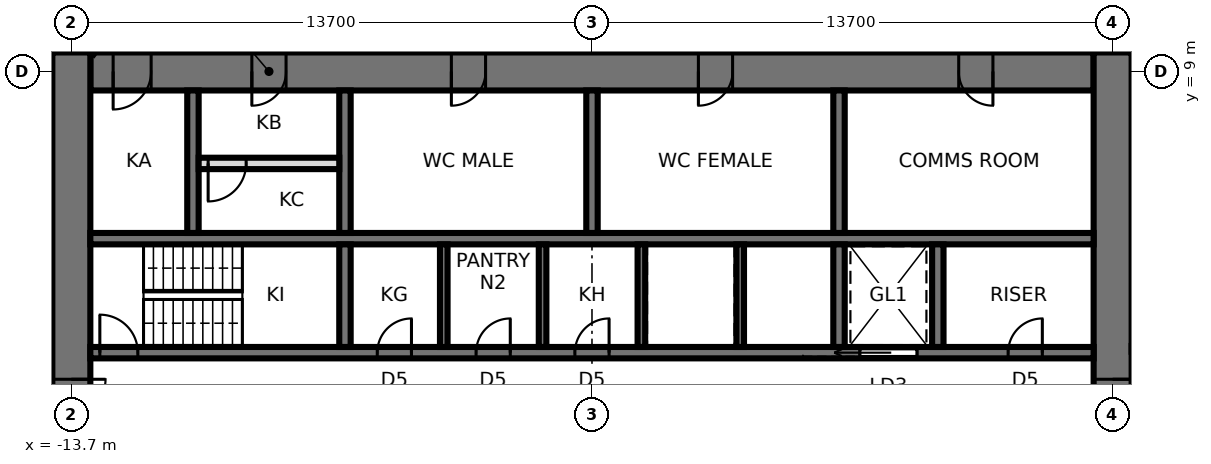
"""IFC4 building model, lengths in metres.
Left out: names, types, materials, properties, quantities, classifications, styles, units other than length and angle.
Written with IfcOpenShell. Run it as: python <this file> out.ifc"""

import sys

from ifc_helpers import new_model, si_unit, direction, frame, frame_2d, origin, place, context, subcontext, project, spatial, rectangle, extrude, element, fill, save


model = new_model("IFC4")
c1 = context("Model", 3, precision=1e-05, world=origin(), true_north=direction((0.0, 1.0)))
c2 = subcontext(c1, "Body", "Model", "MODEL_VIEW")
j1 = project(units=[si_unit("LENGTHUNIT", "METRE"), si_unit("PLANEANGLEUNIT", "RADIAN")], contexts=[c1])
p1 = place(None, origin())
s1 = spatial("IfcSite", under=j1, at=p1, CompositionType="ELEMENT")
p2 = place(p1, origin())
s2 = spatial("IfcBuilding", under=s1, at=p2, CompositionType="ELEMENT")
p3 = place(p2, frame((0.0, 0.0, 154.8)))
s3 = spatial("IfcBuildingStorey", under=s2, at=p3, CompositionType="ELEMENT", Elevation=154.8)
p4 = place(p3, frame((13.2, 9.0, 0.0), z_axis=(0.0, 0.0, 1.0), x_axis=(-1.0, 0.0, 0.0)))
e1 = element("IfcWall", 1, at=p4, inside=s3, PredefinedType="SHEAR", context=c2, shape_type="SweptSolid", body=[
    extrude(rectangle(XDim=26.4, YDim=1.0, at=frame_2d((13.2, 0.0))), origin(), (0.0, 0.0, 1.0), 3.9),
])
p5 = place(p4, frame((2.65, 0.0, 0.0)))
e2 = element("IfcOpeningElement", 2, at=p5, cuts=e1, PredefinedType="OPENING", context=c2, shape_type="SweptSolid", body=[
    extrude(rectangle(XDim=0.9, YDim=2.1, at=frame_2d((0.45, 1.05))), frame((0.0, 0.51, 0.0), z_axis=(0.0, -1.0, 0.0), x_axis=(1.0, 0.0, 0.0)), (0.0, 0.0, 1.0), 1.02),
])
p6 = place(p4, frame((9.5, 0.0, 0.0)))
e3 = element("IfcOpeningElement", 3, at=p6, cuts=e1, PredefinedType="OPENING", context=c2, shape_type="SweptSolid", body=[
    extrude(rectangle(XDim=0.9, YDim=2.1, at=frame_2d((0.45, 1.05))), frame((0.0, 0.51, 0.0), z_axis=(0.0, -1.0, 0.0), x_axis=(1.0, 0.0, 0.0)), (0.0, 0.0, 1.0), 1.02),
])
p7 = place(p4, frame((16.0, 0.0, 0.0)))
e4 = element("IfcOpeningElement", 4, at=p7, cuts=e1, PredefinedType="OPENING", context=c2, shape_type="SweptSolid", body=[
    extrude(rectangle(XDim=0.9, YDim=2.1, at=frame_2d((0.45, 1.05))), frame((0.0, 0.51, 0.0), z_axis=(0.0, -1.0, 0.0), x_axis=(1.0, 0.0, 0.0)), (0.0, 0.0, 1.0), 1.02),
])
p8 = place(p4, frame((21.25, 0.0, 0.0)))
e5 = element("IfcOpeningElement", 5, at=p8, cuts=e1, PredefinedType="OPENING", context=c2, shape_type="SweptSolid", body=[
    extrude(rectangle(XDim=0.9, YDim=2.1, at=frame_2d((0.45, 1.05))), frame((0.0, 0.51, 0.0), z_axis=(0.0, -1.0, 0.0), x_axis=(1.0, 0.0, 0.0)), (0.0, 0.0, 1.0), 1.02),
])
p9 = place(p4, frame((24.8, 0.0, 0.0)))
e6 = element("IfcOpeningElement", 6, at=p9, cuts=e1, PredefinedType="OPENING", context=c2, shape_type="SweptSolid", body=[
    extrude(rectangle(XDim=1.0, YDim=2.1, at=frame_2d((0.5, 1.05))), frame((0.0, 0.51, 0.0), z_axis=(0.0, -1.0, 0.0), x_axis=(1.0, 0.0, 0.0)), (0.0, 0.0, 1.0), 1.02),
])
p10 = place(p3, frame((13.7, -9.5, 0.0), z_axis=(0.0, 0.0, 1.0), x_axis=(0.0, 1.0, 0.0)))
e7 = element("IfcWall", 7, at=p10, inside=s3, PredefinedType="SHEAR", context=c2, shape_type="SweptSolid", body=[
    extrude(rectangle(XDim=19.0, YDim=1.0, at=frame_2d((9.5, 0.0))), origin(), (0.0, 0.0, 1.0), 3.9),
])
p11 = place(p10, frame((8.6, 0.0, 0.0)))
e8 = element("IfcOpeningElement", 8, at=p11, cuts=e7, PredefinedType="OPENING", context=c2, shape_type="SweptSolid", body=[
    extrude(rectangle(XDim=1.8, YDim=2.4, at=frame_2d((0.9, 1.2))), frame((0.0, 0.51, 0.0), z_axis=(0.0, -1.0, 0.0), x_axis=(1.0, 0.0, 0.0)), (0.0, 0.0, 1.0), 1.02),
])
p12 = place(p3, frame((-13.7, 9.5, 0.0), z_axis=(0.0, 0.0, 1.0), x_axis=(0.0, -1.0, 0.0)))
e9 = element("IfcWall", 9, at=p12, inside=s3, PredefinedType="SHEAR", context=c2, shape_type="SweptSolid", body=[
    extrude(rectangle(XDim=19.0, YDim=1.0, at=frame_2d((9.5, 0.0))), origin(), (0.0, 0.0, 1.0), 3.9),
])
p13 = place(p12, frame((8.6, 0.0, 0.0)))
e10 = element("IfcOpeningElement", 10, at=p13, cuts=e9, PredefinedType="OPENING", context=c2, shape_type="SweptSolid", body=[
    extrude(rectangle(XDim=1.8, YDim=2.4, at=frame_2d((0.9, 1.2))), frame((0.0, 0.51, 0.0), z_axis=(0.0, -1.0, 0.0), x_axis=(1.0, 0.0, 0.0)), (0.0, 0.0, 1.0), 1.02),
])
p14 = place(p3, frame((-13.2, 1.6, 0.0), z_axis=(0.0, 0.0, 1.0), x_axis=(1.0, 0.0, 0.0)))
e11 = element("IfcWall", 11, at=p14, inside=s3, PredefinedType="SHEAR", context=c2, shape_type="SweptSolid", body=[
    extrude(rectangle(XDim=26.4, YDim=0.3, at=frame_2d((13.2, 0.0))), origin(), (0.0, 0.0, 1.0), 3.9),
])
p15 = place(p14, frame((0.25, 0.0, 0.0)))
e12 = element("IfcOpeningElement", 12, at=p15, cuts=e11, PredefinedType="OPENING", context=c2, shape_type="SweptSolid", body=[
    extrude(rectangle(XDim=1.0, YDim=2.1, at=frame_2d((0.5, 1.05))), frame((0.0, 0.16, 0.0), z_axis=(0.0, -1.0, 0.0), x_axis=(1.0, 0.0, 0.0)), (0.0, 0.0, 1.0), 0.32),
])
p16 = place(p14, frame((20.25, 0.0, 0.0)))
e13 = element("IfcOpeningElement", 13, at=p16, cuts=e11, PredefinedType="OPENING", context=c2, shape_type="SweptSolid", body=[
    extrude(rectangle(XDim=1.5, YDim=2.4, at=frame_2d((0.75, 1.2))), frame((0.0, 0.16, 0.0), z_axis=(0.0, -1.0, 0.0), x_axis=(1.0, 0.0, 0.0)), (0.0, 0.0, 1.0), 0.32),
])
p17 = place(p14, frame((7.55, 0.0, 0.0)))
e14 = element("IfcOpeningElement", 14, at=p17, cuts=e11, PredefinedType="OPENING", context=c2, shape_type="SweptSolid", body=[
    extrude(rectangle(XDim=0.9, YDim=2.1, at=frame_2d((0.45, 1.05))), frame((0.0, 0.16, 0.0), z_axis=(0.0, -1.0, 0.0), x_axis=(1.0, 0.0, 0.0)), (0.0, 0.0, 1.0), 0.32),
])
p18 = place(p14, frame((10.15, 0.0, 0.0)))
e15 = element("IfcOpeningElement", 15, at=p18, cuts=e11, PredefinedType="OPENING", context=c2, shape_type="SweptSolid", body=[
    extrude(rectangle(XDim=0.9, YDim=2.1, at=frame_2d((0.45, 1.05))), frame((0.0, 0.16, 0.0), z_axis=(0.0, -1.0, 0.0), x_axis=(1.0, 0.0, 0.0)), (0.0, 0.0, 1.0), 0.32),
])
p19 = place(p14, frame((12.75, 0.0, 0.0)))
e16 = element("IfcOpeningElement", 16, at=p19, cuts=e11, PredefinedType="OPENING", context=c2, shape_type="SweptSolid", body=[
    extrude(rectangle(XDim=0.9, YDim=2.1, at=frame_2d((0.45, 1.05))), frame((0.0, 0.16, 0.0), z_axis=(0.0, -1.0, 0.0), x_axis=(1.0, 0.0, 0.0)), (0.0, 0.0, 1.0), 0.32),
])
p20 = place(p14, frame((24.15, 0.0, 0.0)))
e17 = element("IfcOpeningElement", 17, at=p20, cuts=e11, PredefinedType="OPENING", context=c2, shape_type="SweptSolid", body=[
    extrude(rectangle(XDim=0.9, YDim=2.1, at=frame_2d((0.45, 1.05))), frame((0.0, 0.16, 0.0), z_axis=(0.0, -1.0, 0.0), x_axis=(1.0, 0.0, 0.0)), (0.0, 0.0, 1.0), 0.32),
])
p21 = place(p3, frame((-13.2, 4.6, 0.0), z_axis=(0.0, 0.0, 1.0), x_axis=(1.0, 0.0, 0.0)))
e18 = element("IfcWall", 18, at=p21, inside=s3, PredefinedType="SHEAR", context=c2, shape_type="SweptSolid", body=[
    extrude(rectangle(XDim=26.4, YDim=0.3, at=frame_2d((13.2, 0.0))), origin(), (0.0, 0.0, 1.0), 3.9),
])
p22 = place(p3, frame((-6.5, 1.75, 0.0), z_axis=(0.0, 0.0, 1.0), x_axis=(0.0, 1.0, 0.0)))
e19 = element("IfcWall", 19, at=p22, inside=s3, PredefinedType="SHEAR", context=c2, shape_type="SweptSolid", body=[
    extrude(rectangle(XDim=2.7, YDim=0.3, at=frame_2d((1.35, 0.0))), origin(), (0.0, 0.0, 1.0), 3.9),
])
p23 = place(p3, frame((-6.5, 4.75, 0.0), z_axis=(0.0, 0.0, 1.0), x_axis=(0.0, 1.0, 0.0)))
e20 = element("IfcWall", 20, at=p23, inside=s3, PredefinedType="SHEAR", context=c2, shape_type="SweptSolid", body=[
    extrude(rectangle(XDim=3.75, YDim=0.3, at=frame_2d((1.875, 0.0))), origin(), (0.0, 0.0, 1.0), 3.9),
])
p24 = place(p3, frame((6.5, 1.75, 0.0), z_axis=(0.0, 0.0, 1.0), x_axis=(0.0, 1.0, 0.0)))
e21 = element("IfcWall", 21, at=p24, inside=s3, PredefinedType="SHEAR", context=c2, shape_type="SweptSolid", body=[
    extrude(rectangle(XDim=2.7, YDim=0.3, at=frame_2d((1.35, 0.0))), origin(), (0.0, 0.0, 1.0), 3.9),
])
p25 = place(p3, frame((6.5, 4.75, 0.0), z_axis=(0.0, 0.0, 1.0), x_axis=(0.0, 1.0, 0.0)))
e22 = element("IfcWall", 22, at=p25, inside=s3, PredefinedType="SHEAR", context=c2, shape_type="SweptSolid", body=[
    extrude(rectangle(XDim=3.75, YDim=0.3, at=frame_2d((1.875, 0.0))), origin(), (0.0, 0.0, 1.0), 3.9),
])
for number, where, z_axis, x_axis in (
    (23, (-3.9, 1.75, 0.0), (0.0, 0.0, 1.0), (0.0, 1.0, 0.0)),
    (24, (-1.3, 1.75, 0.0), (0.0, 0.0, 1.0), (0.0, 1.0, 0.0)),
    (25, (1.3, 1.75, 0.0), (0.0, 0.0, 1.0), (0.0, 1.0, 0.0)),
    (26, (3.9, 1.75, 0.0), (0.0, 0.0, 1.0), (0.0, 1.0, 0.0)),
):
    element("IfcWall", number, at=place(p3, frame(where, z_axis=z_axis, x_axis=x_axis)), inside=s3, PredefinedType="SHEAR", context=c2, shape_type="SweptSolid", body=[
        extrude(rectangle(XDim=2.7, YDim=0.2, at=frame_2d((1.35, 0.0))), origin(), (0.0, 0.0, 1.0), 3.9),
    ])
for number, where, z_axis, x_axis in (
    (27, (0.0, 4.75, 0.0), (0.0, 0.0, 1.0), (0.0, 1.0, 0.0)),
    (28, (-10.5, 4.75, 0.0), (0.0, 0.0, 1.0), (0.0, 1.0, 0.0)),
):
    element("IfcWall", number, at=place(p3, frame(where, z_axis=z_axis, x_axis=x_axis)), inside=s3, PredefinedType="SHEAR", context=c2, shape_type="SweptSolid", body=[
        extrude(rectangle(XDim=3.75, YDim=0.3, at=frame_2d((1.875, 0.0))), origin(), (0.0, 0.0, 1.0), 3.9),
    ])
p26 = place(p3, frame((9.1, 1.75, 0.0), z_axis=(0.0, 0.0, 1.0), x_axis=(0.0, 1.0, 0.0)))
e29 = element("IfcWall", 29, at=p26, inside=s3, PredefinedType="SHEAR", context=c2, shape_type="SweptSolid", body=[
    extrude(rectangle(XDim=2.7, YDim=0.3, at=frame_2d((1.35, 0.0))), origin(), (0.0, 0.0, 1.0), 3.9),
])
p27 = place(p3, frame((-10.35, 6.58, 0.0), z_axis=(0.0, 0.0, 1.0), x_axis=(1.0, 0.0, 0.0)))
e30 = element("IfcWall", 30, at=p27, inside=s3, PredefinedType="PARTITIONING", context=c2, shape_type="SweptSolid", body=[
    extrude(rectangle(XDim=3.7, YDim=0.3, at=frame_2d((1.85, 0.0))), origin(), (0.0, 0.0, 1.0), 3.74),
])
p28 = place(p27, frame((0.25, 0.0, 0.0)))
e31 = element("IfcOpeningElement", 31, at=p28, cuts=e30, PredefinedType="OPENING", context=c2, shape_type="SweptSolid", body=[
    extrude(rectangle(XDim=1.0, YDim=2.4, at=frame_2d((0.5, 1.2))), frame((0.0, 0.16, 0.0), z_axis=(0.0, -1.0, 0.0), x_axis=(1.0, 0.0, 0.0)), (0.0, 0.0, 1.0), 0.32),
])
p29 = place(p3, frame((-19.584, 14.229, 0.0), z_axis=(0.0, 0.0, 1.0), x_axis=(0.809005026648, -0.587801724103, 0.0)))
e32 = element("IfcWall", 32, at=p29, inside=s3, PredefinedType="PARTITIONING", context=c2, shape_type="SweptSolid", body=[
    extrude(rectangle(XDim=8.045, YDim=0.12, at=frame_2d((4.022, 0.0))), origin(), (0.0, 0.0, 1.0), 2.94),
])
p30 = place(p13, origin())
e33 = element("IfcDoor", 33, at=p30, inside=s3, OperationType="DOUBLE_DOOR_SINGLE_SWING", PredefinedType="DOOR", context=c2, shape_type="SweptSolid", body=[
    extrude(rectangle(XDim=1.72, YDim=2.36, at=frame_2d((0.9, 1.18))), frame((0.0, 0.025, 0.0), z_axis=(0.0, -1.0, 0.0), x_axis=(1.0, 0.0, 0.0)), (0.0, 0.0, 1.0), 0.05),
    extrude(rectangle(XDim=0.04, YDim=2.4, at=frame_2d((0.02, 1.2))), frame((0.0, 0.25, 0.0), z_axis=(0.0, -1.0, 0.0), x_axis=(1.0, 0.0, 0.0)), (0.0, 0.0, 1.0), 0.5),
    extrude(rectangle(XDim=0.04, YDim=2.4, at=frame_2d((1.78, 1.2))), frame((0.0, 0.25, 0.0), z_axis=(0.0, -1.0, 0.0), x_axis=(1.0, 0.0, 0.0)), (0.0, 0.0, 1.0), 0.5),
    extrude(rectangle(XDim=1.72, YDim=0.04, at=frame_2d((0.9, 2.38))), frame((0.0, 0.25, 0.0), z_axis=(0.0, -1.0, 0.0), x_axis=(1.0, 0.0, 0.0)), (0.0, 0.0, 1.0), 0.5),
])
fill(e10, e33)
p31 = place(p11, frame((1.8, 0.0, 0.0), z_axis=(0.0, 0.0, 1.0), x_axis=(-1.0, 0.0, 0.0)))
e34 = element("IfcDoor", 34, at=p31, inside=s3, OperationType="DOUBLE_DOOR_SINGLE_SWING", PredefinedType="DOOR", context=c2, shape_type="SweptSolid", body=[
    extrude(rectangle(XDim=1.72, YDim=2.36, at=frame_2d((0.9, 1.18))), frame((0.0, 0.025, 0.0), z_axis=(0.0, -1.0, 0.0), x_axis=(1.0, 0.0, 0.0)), (0.0, 0.0, 1.0), 0.05),
    extrude(rectangle(XDim=0.04, YDim=2.4, at=frame_2d((1.78, 1.2))), frame((0.0, 0.25, 0.0), z_axis=(0.0, -1.0, 0.0), x_axis=(1.0, 0.0, 0.0)), (0.0, 0.0, 1.0), 0.5),
    extrude(rectangle(XDim=0.04, YDim=2.4, at=frame_2d((0.02, 1.2))), frame((0.0, 0.25, 0.0), z_axis=(0.0, -1.0, 0.0), x_axis=(1.0, 0.0, 0.0)), (0.0, 0.0, 1.0), 0.5),
    extrude(rectangle(XDim=1.72, YDim=0.04, at=frame_2d((0.9, 2.38))), frame((0.0, 0.25, 0.0), z_axis=(0.0, -1.0, 0.0), x_axis=(1.0, 0.0, 0.0)), (0.0, 0.0, 1.0), 0.5),
])
fill(e8, e34)
p32 = place(p15, origin())
e35 = element("IfcDoor", 35, at=p32, inside=s3, OperationType="SINGLE_SWING_LEFT", PredefinedType="DOOR", context=c2, shape_type="SweptSolid", body=[
    extrude(rectangle(XDim=1.0, YDim=2.1, at=frame_2d((0.5, 1.05))), frame((0.0, 0.025, 0.0), z_axis=(0.0, -1.0, 0.0), x_axis=(1.0, 0.0, 0.0)), (0.0, 0.0, 1.0), 0.05),
])
fill(e12, e35)
p33 = place(p16, origin())
e36 = element("IfcDoor", 36, at=p33, inside=s3, OperationType="SLIDING_TO_LEFT", PredefinedType="DOOR", context=c2, shape_type="SweptSolid", body=[
    extrude(rectangle(XDim=1.5, YDim=2.4, at=frame_2d((0.75, 1.2))), frame((0.0, 0.025, 0.0), z_axis=(0.0, -1.0, 0.0), x_axis=(1.0, 0.0, 0.0)), (0.0, 0.0, 1.0), 0.05),
])
fill(e13, e36)
p34 = place(p17, origin())
e37 = element("IfcDoor", 37, at=p34, inside=s3, OperationType="SINGLE_SWING_RIGHT", PredefinedType="DOOR", context=c2, shape_type="SweptSolid", body=[
    extrude(rectangle(XDim=0.9, YDim=2.1, at=frame_2d((0.45, 1.05))), frame((0.0, 0.025, 0.0), z_axis=(0.0, -1.0, 0.0), x_axis=(1.0, 0.0, 0.0)), (0.0, 0.0, 1.0), 0.05),
])
fill(e14, e37)
p35 = place(p18, origin())
e38 = element("IfcDoor", 38, at=p35, inside=s3, OperationType="SINGLE_SWING_RIGHT", PredefinedType="DOOR", context=c2, shape_type="SweptSolid", body=[
    extrude(rectangle(XDim=0.9, YDim=2.1, at=frame_2d((0.45, 1.05))), frame((0.0, 0.025, 0.0), z_axis=(0.0, -1.0, 0.0), x_axis=(1.0, 0.0, 0.0)), (0.0, 0.0, 1.0), 0.05),
])
fill(e15, e38)
p36 = place(p19, origin())
e39 = element("IfcDoor", 39, at=p36, inside=s3, OperationType="SINGLE_SWING_RIGHT", PredefinedType="DOOR", context=c2, shape_type="SweptSolid", body=[
    extrude(rectangle(XDim=0.9, YDim=2.1, at=frame_2d((0.45, 1.05))), frame((0.0, 0.025, 0.0), z_axis=(0.0, -1.0, 0.0), x_axis=(1.0, 0.0, 0.0)), (0.0, 0.0, 1.0), 0.05),
])
fill(e16, e39)
p37 = place(p20, origin())
e40 = element("IfcDoor", 40, at=p37, inside=s3, OperationType="SINGLE_SWING_RIGHT", PredefinedType="DOOR", context=c2, shape_type="SweptSolid", body=[
    extrude(rectangle(XDim=0.9, YDim=2.1, at=frame_2d((0.45, 1.05))), frame((0.0, 0.025, 0.0), z_axis=(0.0, -1.0, 0.0), x_axis=(1.0, 0.0, 0.0)), (0.0, 0.0, 1.0), 0.05),
])
fill(e17, e40)
p38 = place(p5, origin())
e41 = element("IfcDoor", 41, at=p38, inside=s3, OperationType="SINGLE_SWING_LEFT", PredefinedType="DOOR", context=c2, shape_type="SweptSolid", body=[
    extrude(rectangle(XDim=0.82, YDim=2.06, at=frame_2d((0.45, 1.03))), frame((0.0, 0.025, 0.0), z_axis=(0.0, -1.0, 0.0), x_axis=(1.0, 0.0, 0.0)), (0.0, 0.0, 1.0), 0.05),
    extrude(rectangle(XDim=0.04, YDim=2.1, at=frame_2d((0.02, 1.05))), frame((0.0, 0.25, 0.0), z_axis=(0.0, -1.0, 0.0), x_axis=(1.0, 0.0, 0.0)), (0.0, 0.0, 1.0), 0.5),
    extrude(rectangle(XDim=0.04, YDim=2.1, at=frame_2d((0.88, 1.05))), frame((0.0, 0.25, 0.0), z_axis=(0.0, -1.0, 0.0), x_axis=(1.0, 0.0, 0.0)), (0.0, 0.0, 1.0), 0.5),
    extrude(rectangle(XDim=0.82, YDim=0.04, at=frame_2d((0.45, 2.08))), frame((0.0, 0.25, 0.0), z_axis=(0.0, -1.0, 0.0), x_axis=(1.0, 0.0, 0.0)), (0.0, 0.0, 1.0), 0.5),
])
fill(e2, e41)
p39 = place(p6, origin())
e42 = element("IfcDoor", 42, at=p39, inside=s3, OperationType="SINGLE_SWING_RIGHT", PredefinedType="DOOR", context=c2, shape_type="SweptSolid", body=[
    extrude(rectangle(XDim=0.82, YDim=2.06, at=frame_2d((0.45, 1.03))), frame((0.0, 0.025, 0.0), z_axis=(0.0, -1.0, 0.0), x_axis=(1.0, 0.0, 0.0)), (0.0, 0.0, 1.0), 0.05),
    extrude(rectangle(XDim=0.04, YDim=2.1, at=frame_2d((0.02, 1.05))), frame((0.0, 0.25, 0.0), z_axis=(0.0, -1.0, 0.0), x_axis=(1.0, 0.0, 0.0)), (0.0, 0.0, 1.0), 0.5),
    extrude(rectangle(XDim=0.04, YDim=2.1, at=frame_2d((0.88, 1.05))), frame((0.0, 0.25, 0.0), z_axis=(0.0, -1.0, 0.0), x_axis=(1.0, 0.0, 0.0)), (0.0, 0.0, 1.0), 0.5),
    extrude(rectangle(XDim=0.82, YDim=0.04, at=frame_2d((0.45, 2.08))), frame((0.0, 0.25, 0.0), z_axis=(0.0, -1.0, 0.0), x_axis=(1.0, 0.0, 0.0)), (0.0, 0.0, 1.0), 0.5),
])
fill(e3, e42)
p40 = place(p7, origin())
e43 = element("IfcDoor", 43, at=p40, inside=s3, OperationType="SINGLE_SWING_RIGHT", PredefinedType="DOOR", context=c2, shape_type="SweptSolid", body=[
    extrude(rectangle(XDim=0.82, YDim=2.06, at=frame_2d((0.45, 1.03))), frame((0.0, 0.025, 0.0), z_axis=(0.0, -1.0, 0.0), x_axis=(1.0, 0.0, 0.0)), (0.0, 0.0, 1.0), 0.05),
    extrude(rectangle(XDim=0.04, YDim=2.1, at=frame_2d((0.02, 1.05))), frame((0.0, 0.25, 0.0), z_axis=(0.0, -1.0, 0.0), x_axis=(1.0, 0.0, 0.0)), (0.0, 0.0, 1.0), 0.5),
    extrude(rectangle(XDim=0.04, YDim=2.1, at=frame_2d((0.88, 1.05))), frame((0.0, 0.25, 0.0), z_axis=(0.0, -1.0, 0.0), x_axis=(1.0, 0.0, 0.0)), (0.0, 0.0, 1.0), 0.5),
    extrude(rectangle(XDim=0.82, YDim=0.04, at=frame_2d((0.45, 2.08))), frame((0.0, 0.25, 0.0), z_axis=(0.0, -1.0, 0.0), x_axis=(1.0, 0.0, 0.0)), (0.0, 0.0, 1.0), 0.5),
])
fill(e4, e43)
p41 = place(p8, origin())
e44 = element("IfcDoor", 44, at=p41, inside=s3, OperationType="SINGLE_SWING_RIGHT", PredefinedType="DOOR", context=c2, shape_type="SweptSolid", body=[
    extrude(rectangle(XDim=0.82, YDim=2.06, at=frame_2d((0.45, 1.03))), frame((0.0, 0.025, 0.0), z_axis=(0.0, -1.0, 0.0), x_axis=(1.0, 0.0, 0.0)), (0.0, 0.0, 1.0), 0.05),
    extrude(rectangle(XDim=0.04, YDim=2.1, at=frame_2d((0.02, 1.05))), frame((0.0, 0.25, 0.0), z_axis=(0.0, -1.0, 0.0), x_axis=(1.0, 0.0, 0.0)), (0.0, 0.0, 1.0), 0.5),
    extrude(rectangle(XDim=0.04, YDim=2.1, at=frame_2d((0.88, 1.05))), frame((0.0, 0.25, 0.0), z_axis=(0.0, -1.0, 0.0), x_axis=(1.0, 0.0, 0.0)), (0.0, 0.0, 1.0), 0.5),
    extrude(rectangle(XDim=0.82, YDim=0.04, at=frame_2d((0.45, 2.08))), frame((0.0, 0.25, 0.0), z_axis=(0.0, -1.0, 0.0), x_axis=(1.0, 0.0, 0.0)), (0.0, 0.0, 1.0), 0.5),
])
fill(e5, e44)
p42 = place(p9, origin())
e45 = element("IfcDoor", 45, at=p42, inside=s3, OperationType="SINGLE_SWING_RIGHT", PredefinedType="DOOR", context=c2, shape_type="SweptSolid", body=[
    extrude(rectangle(XDim=0.92, YDim=2.06, at=frame_2d((0.5, 1.03))), frame((0.0, 0.025, 0.0), z_axis=(0.0, -1.0, 0.0), x_axis=(1.0, 0.0, 0.0)), (0.0, 0.0, 1.0), 0.05),
    extrude(rectangle(XDim=0.04, YDim=2.1, at=frame_2d((0.02, 1.05))), frame((0.0, 0.25, 0.0), z_axis=(0.0, -1.0, 0.0), x_axis=(1.0, 0.0, 0.0)), (0.0, 0.0, 1.0), 0.5),
    extrude(rectangle(XDim=0.04, YDim=2.1, at=frame_2d((0.98, 1.05))), frame((0.0, 0.25, 0.0), z_axis=(0.0, -1.0, 0.0), x_axis=(1.0, 0.0, 0.0)), (0.0, 0.0, 1.0), 0.5),
    extrude(rectangle(XDim=0.92, YDim=0.04, at=frame_2d((0.5, 2.08))), frame((0.0, 0.25, 0.0), z_axis=(0.0, -1.0, 0.0), x_axis=(1.0, 0.0, 0.0)), (0.0, 0.0, 1.0), 0.5),
])
fill(e6, e45)
p43 = place(p28, frame((1.0, 0.0, 0.0), z_axis=(0.0, 0.0, 1.0), x_axis=(-1.0, 0.0, 0.0)))
e46 = element("IfcDoor", 46, at=p43, inside=s3, OperationType="SINGLE_SWING_RIGHT", PredefinedType="DOOR", context=c2, shape_type="SweptSolid", body=[
    extrude(rectangle(XDim=1.0, YDim=2.4, at=frame_2d((0.5, 1.2))), frame((0.0, 0.025, 0.0), z_axis=(0.0, -1.0, 0.0), x_axis=(1.0, 0.0, 0.0)), (0.0, 0.0, 1.0), 0.05),
])
fill(e31, e46)
save(model, sys.argv[1])
